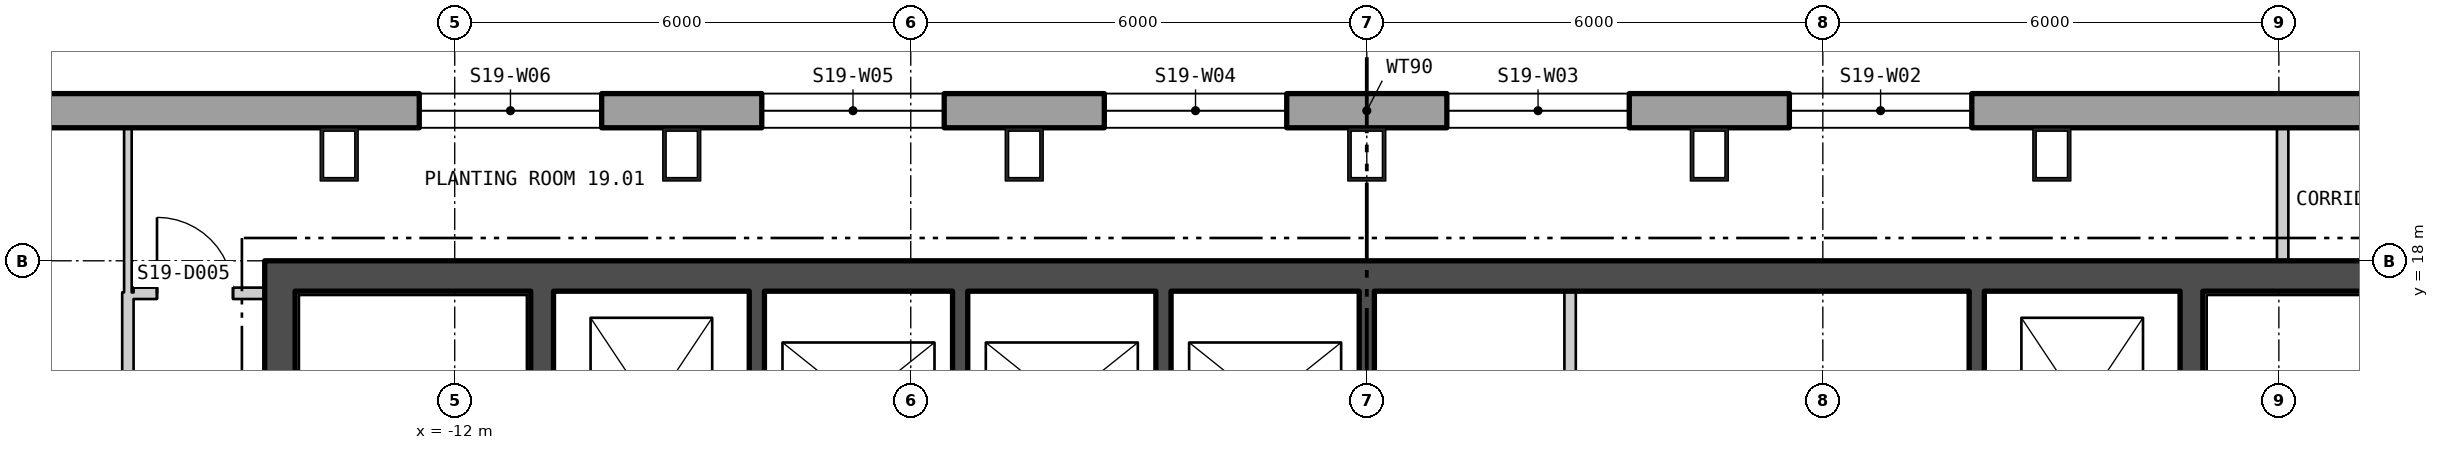
"""IFC4 building model, lengths in metres.
Left out: names, types, materials, properties, quantities, classifications, styles, units other than length and angle.
Written with IfcOpenShell. Run it as: python <this file> out.ifc"""

import sys

from ifc_helpers import new_model, si_unit, direction, frame, frame_2d, origin, origin_2d, place, context, subcontext, project, spatial, polyline, rectangle, hollow_rectangle, outline, extrude, element, fill, save


model = new_model("IFC4")
c1 = context("Model", 3, precision=1e-05, world=origin(), true_north=direction((0.0, 1.0)))
c2 = subcontext(c1, "Body", "Model", "MODEL_VIEW")
j1 = project(units=[si_unit("LENGTHUNIT", "METRE"), si_unit("PLANEANGLEUNIT", "RADIAN")], contexts=[c1])
p1 = place(None, origin())
s1 = spatial("IfcSite", under=j1, at=p1, CompositionType="ELEMENT")
p2 = place(p1, origin())
s2 = spatial("IfcBuilding", under=s1, at=p2, CompositionType="ELEMENT")
p3 = place(p2, frame((0.0, 0.0, 257.1)))
s3 = spatial("IfcBuildingStorey", under=s2, at=p3, CompositionType="ELEMENT", Elevation=257.1)
for number, where, z_axis, x_axis in (
    (1, (9.013, 19.4, 0.0), (0.0, 0.0, 1.0), (-1.0, 0.0, 0.0)),
    (2, (4.507, 19.4, 0.0), (0.0, 0.0, 1.0), (-1.0, 0.0, 0.0)),
    (3, (0.0, 19.4, 0.0), (0.0, 0.0, 1.0), (-1.0, 0.0, 0.0)),
    (4, (-4.507, 19.4, 0.0), (0.0, 0.0, 1.0), (-1.0, 0.0, 0.0)),
    (5, (-9.013, 19.4, 0.0), (0.0, 0.0, 1.0), (-1.0, 0.0, 0.0)),
    (6, (-13.52, 19.4, 0.0), (0.0, 0.0, 1.0), (-1.0, 0.0, 0.0)),
):
    element("IfcColumn", number, at=place(p3, frame(where, z_axis=z_axis, x_axis=x_axis)), inside=s3, PredefinedType="COLUMN", context=c2, shape_type="SweptSolid", body=[
        extrude(hollow_rectangle(XDim=0.5, YDim=0.7, WallThickness=0.045, at=origin_2d()), origin(), (0.0, 0.0, 1.0), 3.9),
    ])
p4 = place(p3, frame((22.865, 19.975, -0.4), z_axis=(0.0, 0.0, 1.0), x_axis=(-1.0, 0.0, 0.0)))
e7 = element("IfcWall", 7, at=p4, inside=s3, PredefinedType="SOLIDWALL", context=c2, shape_type="SweptSolid", body=[
    extrude(outline(polyline([(-0.13, -0.225), (45.86, -0.225), (45.6, 0.225), (0.13, 0.225), (-0.13, -0.225)])), origin(), (0.0, 0.0, 1.0), 3.9),
])
p5 = place(p4, frame((1.424, 0.0, 1.3)))
e8 = element("IfcOpeningElement", 8, at=p5, cuts=e7, PredefinedType="OPENING", context=c2, shape_type="SweptSolid", body=[
    extrude(rectangle(XDim=2.4, YDim=2.0, at=frame_2d((1.2, 1.0))), frame((0.0, 0.235, 0.0), z_axis=(0.0, -1.0, 0.0), x_axis=(1.0, 0.0, 0.0)), (0.0, 0.0, 1.0), 0.47),
])
p6 = place(p4, frame((14.905, 0.0, 1.3)))
e9 = element("IfcOpeningElement", 9, at=p6, cuts=e7, PredefinedType="OPENING", context=c2, shape_type="SweptSolid", body=[
    extrude(rectangle(XDim=2.4, YDim=2.0, at=frame_2d((1.2, 1.0))), frame((0.0, 0.235, 0.0), z_axis=(0.0, -1.0, 0.0), x_axis=(1.0, 0.0, 0.0)), (0.0, 0.0, 1.0), 0.47),
])
p7 = place(p4, frame((19.412, 0.0, 1.3)))
e10 = element("IfcOpeningElement", 10, at=p7, cuts=e7, PredefinedType="OPENING", context=c2, shape_type="SweptSolid", body=[
    extrude(rectangle(XDim=2.4, YDim=2.0, at=frame_2d((1.2, 1.0))), frame((0.0, 0.235, 0.0), z_axis=(0.0, -1.0, 0.0), x_axis=(1.0, 0.0, 0.0)), (0.0, 0.0, 1.0), 0.47),
])
p8 = place(p4, frame((23.918, 0.0, 1.3)))
e11 = element("IfcOpeningElement", 11, at=p8, cuts=e7, PredefinedType="OPENING", context=c2, shape_type="SweptSolid", body=[
    extrude(rectangle(XDim=2.4, YDim=2.0, at=frame_2d((1.2, 1.0))), frame((0.0, 0.235, 0.0), z_axis=(0.0, -1.0, 0.0), x_axis=(1.0, 0.0, 0.0)), (0.0, 0.0, 1.0), 0.47),
])
p9 = place(p4, frame((28.425, 0.0, 1.3)))
e12 = element("IfcOpeningElement", 12, at=p9, cuts=e7, PredefinedType="OPENING", context=c2, shape_type="SweptSolid", body=[
    extrude(rectangle(XDim=2.4, YDim=2.0, at=frame_2d((1.2, 1.0))), frame((0.0, 0.235, 0.0), z_axis=(0.0, -1.0, 0.0), x_axis=(1.0, 0.0, 0.0)), (0.0, 0.0, 1.0), 0.47),
])
p10 = place(p4, frame((32.932, 0.0, 1.3)))
e13 = element("IfcOpeningElement", 13, at=p10, cuts=e7, PredefinedType="OPENING", context=c2, shape_type="SweptSolid", body=[
    extrude(rectangle(XDim=2.4, YDim=2.0, at=frame_2d((1.2, 1.0))), frame((0.0, 0.235, 0.0), z_axis=(0.0, -1.0, 0.0), x_axis=(1.0, 0.0, 0.0)), (0.0, 0.0, 1.0), 0.47),
])
p11 = place(p4, frame((41.907, 0.0, 1.3)))
e14 = element("IfcOpeningElement", 14, at=p11, cuts=e7, PredefinedType="OPENING", context=c2, shape_type="SweptSolid", body=[
    extrude(rectangle(XDim=2.4, YDim=2.0, at=frame_2d((1.2, 1.0))), frame((0.0, 0.235, 0.0), z_axis=(0.0, -1.0, 0.0), x_axis=(1.0, 0.0, 0.0)), (0.0, 0.0, 1.0), 0.47),
])
p12 = place(p3, frame((-14.5, 17.8, 0.0), z_axis=(0.0, 0.0, 1.0), x_axis=(1.0, 0.0, 0.0)))
e15 = element("IfcWall", 15, at=p12, inside=s3, PredefinedType="SHEAR", context=c2, shape_type="SweptSolid", body=[
    extrude(rectangle(XDim=29.0, YDim=0.4, at=frame_2d((14.5, 0.0))), origin(), (0.0, 0.0, 1.0), 3.7),
])
p13 = place(p3, frame((-14.3, 4.4, 0.0), z_axis=(0.0, 0.0, 1.0), x_axis=(0.0, 1.0, 0.0)))
e16 = element("IfcWall", 16, at=p13, inside=s3, PredefinedType="SHEAR", context=c2, shape_type="SweptSolid", body=[
    extrude(rectangle(XDim=13.2, YDim=0.4, at=frame_2d((6.6, 0.0))), origin(), (0.0, 0.0, 1.0), 3.7),
])
p14 = place(p13, frame((3.05, 0.0, 0.0)))
e17 = element("IfcOpeningElement", 17, at=p14, cuts=e16, PredefinedType="OPENING", context=c2, shape_type="SweptSolid", body=[
    extrude(rectangle(XDim=1.5, YDim=2.1, at=frame_2d((0.75, 1.05))), frame((0.0, 0.21, 0.0), z_axis=(0.0, -1.0, 0.0), x_axis=(1.0, 0.0, 0.0)), (0.0, 0.0, 1.0), 0.42),
])
p15 = place(p3, frame((-10.85, 4.4, 0.0), z_axis=(0.0, 0.0, 1.0), x_axis=(0.0, 1.0, 0.0)))
e18 = element("IfcWall", 18, at=p15, inside=s3, PredefinedType="SHEAR", context=c2, shape_type="SweptSolid", body=[
    extrude(rectangle(XDim=13.2, YDim=0.3, at=frame_2d((6.6, 0.0))), origin(), (0.0, 0.0, 1.0), 3.7),
])
p16 = place(p15, frame((1.575, 0.0, 0.0)))
e19 = element("IfcOpeningElement", 19, at=p16, cuts=e18, PredefinedType="OPENING", context=c2, shape_type="SweptSolid", body=[
    extrude(rectangle(XDim=1.25, YDim=2.1, at=frame_2d((0.625, 1.05))), frame((0.0, 0.16, 0.0), z_axis=(0.0, -1.0, 0.0), x_axis=(1.0, 0.0, 0.0)), (0.0, 0.0, 1.0), 0.32),
])
p17 = place(p15, frame((0.4, 0.0, 0.0)))
e20 = element("IfcOpeningElement", 20, at=p17, cuts=e18, PredefinedType="OPENING", context=c2, shape_type="SweptSolid", body=[
    extrude(rectangle(XDim=0.9, YDim=2.1, at=frame_2d((0.45, 1.05))), frame((0.0, 0.16, 0.0), z_axis=(0.0, -1.0, 0.0), x_axis=(1.0, 0.0, 0.0)), (0.0, 0.0, 1.0), 0.32),
])
p18 = place(p3, frame((10.85, 4.4, 0.0), z_axis=(0.0, 0.0, 1.0), x_axis=(0.0, 1.0, 0.0)))
e21 = element("IfcWall", 21, at=p18, inside=s3, PredefinedType="SHEAR", context=c2, shape_type="SweptSolid", body=[
    extrude(rectangle(XDim=13.2, YDim=0.3, at=frame_2d((6.6, 0.0))), origin(), (0.0, 0.0, 1.0), 3.7),
])
p19 = place(p18, frame((1.575, 0.0, 0.0)))
e22 = element("IfcOpeningElement", 22, at=p19, cuts=e21, PredefinedType="OPENING", context=c2, shape_type="SweptSolid", body=[
    extrude(rectangle(XDim=1.25, YDim=2.1, at=frame_2d((0.625, 1.05))), frame((0.0, 0.16, 0.0), z_axis=(0.0, -1.0, 0.0), x_axis=(1.0, 0.0, 0.0)), (0.0, 0.0, 1.0), 0.32),
])
p20 = place(p18, frame((0.4, 0.0, 0.0)))
e23 = element("IfcOpeningElement", 23, at=p20, cuts=e21, PredefinedType="OPENING", context=c2, shape_type="SweptSolid", body=[
    extrude(rectangle(XDim=0.9, YDim=2.1, at=frame_2d((0.45, 1.05))), frame((0.0, 0.16, 0.0), z_axis=(0.0, -1.0, 0.0), x_axis=(1.0, 0.0, 0.0)), (0.0, 0.0, 1.0), 0.32),
])
for number, where, z_axis, x_axis in (
    (24, (-8.025, 14.7, 0.0), (0.0, 0.0, 1.0), (0.0, 1.0, 0.0)),
    (25, (-5.35, 14.7, 0.0), (0.0, 0.0, 1.0), (0.0, 1.0, 0.0)),
    (26, (-2.675, 14.7, 0.0), (0.0, 0.0, 1.0), (0.0, 1.0, 0.0)),
    (27, (0.0, 14.7, 0.0), (0.0, 0.0, 1.0), (0.0, 1.0, 0.0)),
):
    element("IfcWall", number, at=place(p3, frame(where, z_axis=z_axis, x_axis=x_axis)), inside=s3, PredefinedType="SHEAR", context=c2, shape_type="SweptSolid", body=[
        extrude(rectangle(XDim=2.9, YDim=0.2, at=frame_2d((1.45, 0.0))), origin(), (0.0, 0.0, 1.0), 3.7),
    ])
p21 = place(p3, frame((2.675, 14.7, 0.0), z_axis=(0.0, 0.0, 1.0), x_axis=(0.0, 1.0, 0.0)))
e28 = element("IfcWall", 28, at=p21, inside=s3, PredefinedType="PARTITIONING", context=c2, shape_type="SweptSolid", body=[
    extrude(rectangle(XDim=2.9, YDim=0.15, at=frame_2d((1.45, 0.0))), origin(), (0.0, 0.0, 1.0), 3.7),
])
p22 = place(p3, frame((8.025, 14.7, 0.0), z_axis=(0.0, 0.0, 1.0), x_axis=(0.0, 1.0, 0.0)))
e29 = element("IfcWall", 29, at=p22, inside=s3, PredefinedType="SHEAR", context=c2, shape_type="SweptSolid", body=[
    extrude(rectangle(XDim=2.9, YDim=0.2, at=frame_2d((1.45, 0.0))), origin(), (0.0, 0.0, 1.0), 3.7),
])
p23 = place(p3, frame((-16.3, 2.125, 0.0), z_axis=(0.0, 0.0, 1.0), x_axis=(0.0, 1.0, 0.0)))
e30 = element("IfcWall", 30, at=p23, inside=s3, PredefinedType="PARTITIONING", context=c2, shape_type="SweptSolid", body=[
    extrude(rectangle(XDim=15.459, YDim=0.15, at=frame_2d((7.729, 0.0))), origin(), (0.0, 0.0, 1.0), 3.7),
])
p24 = place(p23, frame((5.99, 0.0, 0.0)))
e31 = element("IfcOpeningElement", 31, at=p24, cuts=e30, PredefinedType="OPENING", context=c2, shape_type="SweptSolid", body=[
    extrude(rectangle(XDim=1.0, YDim=2.1, at=frame_2d((0.5, 1.05))), frame((0.0, 0.085, 0.0), z_axis=(0.0, -1.0, 0.0), x_axis=(1.0, 0.0, 0.0)), (0.0, 0.0, 1.0), 0.17),
])
p25 = place(p23, frame((12.554, 0.0, 0.0)))
e32 = element("IfcOpeningElement", 32, at=p25, cuts=e30, PredefinedType="OPENING", context=c2, shape_type="SweptSolid", body=[
    extrude(rectangle(XDim=1.0, YDim=2.1, at=frame_2d((0.5, 1.05))), frame((0.0, 0.085, 0.0), z_axis=(0.0, -1.0, 0.0), x_axis=(1.0, 0.0, 0.0)), (0.0, 0.0, 1.0), 0.17),
])
p26 = place(p3, frame((-16.3, 17.584, 0.0), z_axis=(0.0, 0.0, 1.0), x_axis=(0.0, 1.0, 0.0)))
e33 = element("IfcWall", 33, at=p26, inside=s3, PredefinedType="PARTITIONING", context=c2, shape_type="SweptSolid", body=[
    extrude(rectangle(XDim=2.166, YDim=0.1, at=frame_2d((1.083, 0.0))), origin(), (0.0, 0.0, 1.0), 3.7),
])
p27 = place(p3, frame((-16.225, 17.572, 0.0), z_axis=(0.0, 0.0, 1.0), x_axis=(1.0, 0.0, 0.0)))
e34 = element("IfcWall", 34, at=p27, inside=s3, PredefinedType="PARTITIONING", context=c2, shape_type="SweptSolid", body=[
    extrude(rectangle(XDim=1.725, YDim=0.15, at=frame_2d((0.863, 0.0))), origin(), (0.0, 0.0, 1.0), 3.7),
])
p28 = place(p27, frame((0.308, 0.0, 0.0)))
e35 = element("IfcOpeningElement", 35, at=p28, cuts=e34, PredefinedType="OPENING", context=c2, shape_type="SweptSolid", body=[
    extrude(rectangle(XDim=1.0, YDim=2.1, at=frame_2d((0.5, 1.05))), frame((0.0, 0.085, 0.0), z_axis=(0.0, -1.0, 0.0), x_axis=(1.0, 0.0, 0.0)), (0.0, 0.0, 1.0), 0.17),
])
p29 = place(p3, frame((12.05, 18.0, 0.0), z_axis=(0.0, 0.0, 1.0), x_axis=(0.0, 1.0, 0.0)))
e36 = element("IfcWall", 36, at=p29, inside=s3, PredefinedType="PARTITIONING", context=c2, shape_type="SweptSolid", body=[
    extrude(rectangle(XDim=1.75, YDim=0.15, at=frame_2d((0.875, 0.0))), origin(), (0.0, 0.0, 1.0), 3.7),
])
p30 = place(p6, origin())
e37 = element("IfcWindow", 37, at=p30, inside=s3, PartitioningType="SINGLE_PANEL", PredefinedType="WINDOW", context=c2, shape_type="SweptSolid", body=[
    extrude(rectangle(XDim=2.4, YDim=2.0, at=frame_2d((1.2, 1.0))), frame((0.0, 0.105, 0.0), z_axis=(0.0, -1.0, 0.0), x_axis=(1.0, 0.0, 0.0)), (0.0, 0.0, 1.0), 0.06),
])
fill(e9, e37)
p31 = place(p7, origin())
e38 = element("IfcWindow", 38, at=p31, inside=s3, PartitioningType="SINGLE_PANEL", PredefinedType="WINDOW", context=c2, shape_type="SweptSolid", body=[
    extrude(rectangle(XDim=2.4, YDim=2.0, at=frame_2d((1.2, 1.0))), frame((0.0, 0.105, 0.0), z_axis=(0.0, -1.0, 0.0), x_axis=(1.0, 0.0, 0.0)), (0.0, 0.0, 1.0), 0.06),
])
fill(e10, e38)
p32 = place(p8, origin())
e39 = element("IfcWindow", 39, at=p32, inside=s3, PartitioningType="SINGLE_PANEL", PredefinedType="WINDOW", context=c2, shape_type="SweptSolid", body=[
    extrude(rectangle(XDim=2.4, YDim=2.0, at=frame_2d((1.2, 1.0))), frame((0.0, 0.105, 0.0), z_axis=(0.0, -1.0, 0.0), x_axis=(1.0, 0.0, 0.0)), (0.0, 0.0, 1.0), 0.06),
])
fill(e11, e39)
p33 = place(p9, origin())
e40 = element("IfcWindow", 40, at=p33, inside=s3, PartitioningType="SINGLE_PANEL", PredefinedType="WINDOW", context=c2, shape_type="SweptSolid", body=[
    extrude(rectangle(XDim=2.4, YDim=2.0, at=frame_2d((1.2, 1.0))), frame((0.0, 0.105, 0.0), z_axis=(0.0, -1.0, 0.0), x_axis=(1.0, 0.0, 0.0)), (0.0, 0.0, 1.0), 0.06),
])
fill(e12, e40)
p34 = place(p10, origin())
e41 = element("IfcWindow", 41, at=p34, inside=s3, PartitioningType="SINGLE_PANEL", PredefinedType="WINDOW", context=c2, shape_type="SweptSolid", body=[
    extrude(rectangle(XDim=2.4, YDim=2.0, at=frame_2d((1.2, 1.0))), frame((0.0, 0.105, 0.0), z_axis=(0.0, -1.0, 0.0), x_axis=(1.0, 0.0, 0.0)), (0.0, 0.0, 1.0), 0.06),
])
fill(e13, e41)
p35 = place(p28, origin())
e42 = element("IfcDoor", 42, at=p35, inside=s3, OperationType="SINGLE_SWING_RIGHT", PredefinedType="DOOR", context=c2, shape_type="SweptSolid", body=[
    extrude(rectangle(XDim=1.0, YDim=2.1, at=frame_2d((0.5, 1.05))), frame((0.0, 0.025, 0.0), z_axis=(0.0, -1.0, 0.0), x_axis=(1.0, 0.0, 0.0)), (0.0, 0.0, 1.0), 0.05),
])
fill(e35, e42)
save(model, sys.argv[1])
